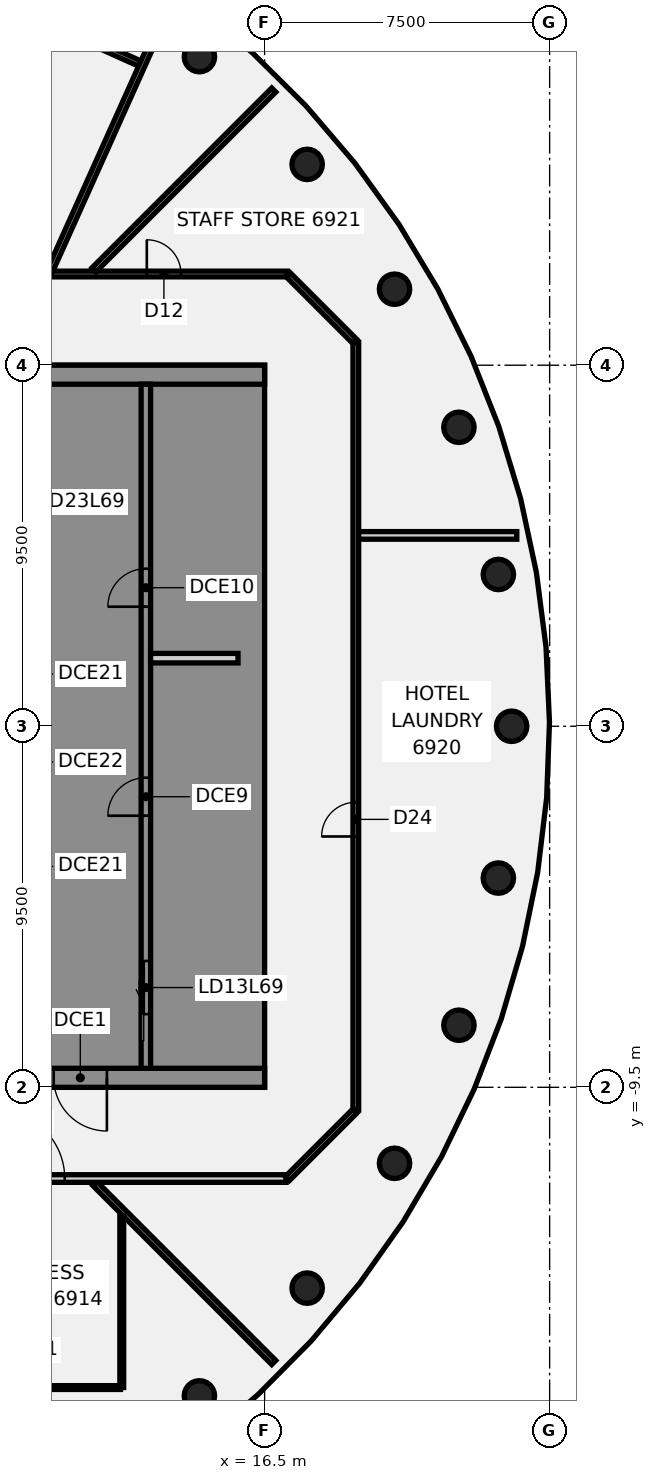
"""IFC4 building model, lengths in metres.
Left out: names, types, materials, properties, quantities, classifications, styles, units other than length and angle.
Written with IfcOpenShell. Run it as: python <this file> out.ifc"""

import sys

from ifc_helpers import new_model, si_unit, direction, frame, frame_2d, origin, origin_2d, place, context, subcontext, project, spatial, polyline, rectangle, circle, outline, extrude, element, fill, save


model = new_model("IFC4")
c1 = context("Model", 3, precision=1e-05, world=origin(), true_north=direction((0.0, 1.0)))
c2 = subcontext(c1, "Body", "Model", "MODEL_VIEW")
j1 = project(units=[si_unit("LENGTHUNIT", "METRE"), si_unit("PLANEANGLEUNIT", "RADIAN")], contexts=[c1])
p1 = place(None, origin())
s1 = spatial("IfcSite", under=j1, at=p1, CompositionType="ELEMENT")
p2 = place(p1, origin())
s2 = spatial("IfcBuilding", under=s1, at=p2, CompositionType="ELEMENT")
p3 = place(p2, frame((0.0, 0.0, 271.2)))
s3 = spatial("IfcBuildingStorey", under=s2, at=p3, CompositionType="ELEMENT", Elevation=271.2)
for number, where, z_axis, x_axis in (
    (1, (23.0, 0.0, -0.14), (0.0, 0.0, 1.0), (1.0, 0.0, 0.0)),
    (2, (22.651, 3.994, -0.14), (0.0, 0.0, 1.0), (1.0, 0.0, 0.0)),
    (3, (21.613, 7.866, -0.14), (0.0, 0.0, 1.0), (1.0, 0.0, 0.0)),
    (4, (19.919, 11.5, -0.14), (0.0, 0.0, 1.0), (1.0, 0.0, 0.0)),
    (5, (17.619, 14.784, -0.14), (0.0, 0.0, 1.0), (1.0, 0.0, 0.0)),
    (6, (14.784, 17.619, -0.14), (0.0, 0.0, 1.0), (1.0, 0.0, 0.0)),
    (7, (14.784, -17.619, -0.14), (0.0, 0.0, 1.0), (1.0, 0.0, 0.0)),
    (8, (17.619, -14.784, -0.14), (0.0, 0.0, 1.0), (1.0, 0.0, 0.0)),
    (9, (19.919, -11.5, -0.14), (0.0, 0.0, 1.0), (1.0, 0.0, 0.0)),
    (10, (21.613, -7.866, -0.14), (0.0, 0.0, 1.0), (1.0, 0.0, 0.0)),
    (11, (22.651, -3.994, -0.14), (0.0, 0.0, 1.0), (1.0, 0.0, 0.0)),
):
    element("IfcColumn", number, at=place(p3, frame(where, z_axis=z_axis, x_axis=x_axis)), inside=s3, PredefinedType="COLUMN", context=c2, shape_type="SweptSolid", body=[
        extrude(circle(Radius=0.4, at=origin_2d()), origin(), (0.0, 0.0, 1.0), 3.6),
    ])
p4 = place(p3, frame((12.034, -12.034, 0.0), z_axis=(0.0, 0.0, 1.0), x_axis=(0.707106781187, -0.707106781187, 0.0)))
e12 = element("IfcWall", 12, at=p4, inside=s3, PredefinedType="PARTITIONING", context=c2, shape_type="SweptSolid", body=[
    extrude(rectangle(XDim=6.655, YDim=0.15, at=frame_2d((3.328, 0.0))), origin(), (0.0, 0.0, 1.0), 2.864),
])
p5 = place(p3, frame((17.128, 11.872, 0.0), z_axis=(0.0, 0.0, 1.0), x_axis=(0.707106781187, -0.707106781187, 0.0)))
e13 = element("IfcWall", 13, at=p5, inside=s3, PredefinedType="PARTITIONING", context=c2, shape_type="SweptSolid", body=[
    extrude(rectangle(XDim=2.465, YDim=0.15, at=frame_2d((1.232, 0.0))), origin(), (0.0, 0.0, 1.0), 2.864),
])
p6 = place(p3, frame((0.344, 23.216, 0.0), z_axis=(0.0, 0.0, 1.0), x_axis=(0.912270853128, -0.409587463838, 0.0)))
e14 = element("IfcWall", 14, at=p6, inside=s3, PredefinedType="PARTITIONING", context=c2, shape_type="SweptSolid", body=[
    extrude(rectangle(XDim=14.109, YDim=0.15, at=frame_2d((7.054, 0.0))), origin(), (0.0, 0.0, 1.0), 2.864),
])
p7 = place(p6, frame((4.65, 0.0, 0.0)))
e15 = element("IfcOpeningElement", 15, at=p7, cuts=e14, PredefinedType="OPENING", context=c2, shape_type="SweptSolid", body=[
    extrude(rectangle(XDim=0.9, YDim=2.1, at=frame_2d((0.45, 1.05))), frame((0.0, 0.085, 0.0), z_axis=(0.0, -1.0, 0.0), x_axis=(1.0, 0.0, 0.0)), (0.0, 0.0, 1.0), 0.17),
])
p8 = place(p3, frame((-17.1, -11.9, 0.0), z_axis=(0.0, 0.0, 1.0), x_axis=(1.0, 0.0, 0.0)))
e16 = element("IfcWall", 16, at=p8, inside=s3, PredefinedType="PARTITIONING", context=c2, shape_type="SweptSolid", body=[
    extrude(rectangle(XDim=34.165, YDim=0.2, at=frame_2d((17.083, 0.0))), origin(), (0.0, 0.0, 1.0), 2.864),
])
p9 = place(p8, frame((6.1, 0.0, 0.0)))
e17 = element("IfcOpeningElement", 17, at=p9, cuts=e16, PredefinedType="OPENING", context=c2, shape_type="SweptSolid", body=[
    extrude(rectangle(XDim=0.9, YDim=2.1, at=frame_2d((0.45, 1.05))), frame((0.0, 0.11, 0.0), z_axis=(0.0, -1.0, 0.0), x_axis=(1.0, 0.0, 0.0)), (0.0, 0.0, 1.0), 0.22),
])
p10 = place(p8, frame((26.541, 0.0, 0.0)))
e18 = element("IfcOpeningElement", 18, at=p10, cuts=e16, PredefinedType="OPENING", context=c2, shape_type="SweptSolid", body=[
    extrude(rectangle(XDim=1.8, YDim=2.1, at=frame_2d((0.9, 1.05))), frame((0.0, 0.11, 0.0), z_axis=(0.0, -1.0, 0.0), x_axis=(1.0, 0.0, 0.0)), (0.0, 0.0, 1.0), 0.22),
])
p11 = place(p8, frame((17.778, 0.0, 0.0)))
e19 = element("IfcOpeningElement", 19, at=p11, cuts=e16, PredefinedType="OPENING", context=c2, shape_type="SweptSolid", body=[
    extrude(rectangle(XDim=1.8, YDim=2.1, at=frame_2d((0.9, 1.05))), frame((0.0, 0.11, 0.0), z_axis=(0.0, -1.0, 0.0), x_axis=(1.0, 0.0, 0.0)), (0.0, 0.0, 1.0), 0.22),
])
p12 = place(p8, frame((10.359, 0.0, 0.0)))
e20 = element("IfcOpeningElement", 20, at=p12, cuts=e16, PredefinedType="OPENING", context=c2, shape_type="SweptSolid", body=[
    extrude(rectangle(XDim=0.9, YDim=2.1, at=frame_2d((0.45, 1.05))), frame((0.0, 0.11, 0.0), z_axis=(0.0, -1.0, 0.0), x_axis=(1.0, 0.0, 0.0)), (0.0, 0.0, 1.0), 0.22),
])
p13 = place(p8, frame((1.65, 0.0, 0.0)))
e21 = element("IfcOpeningElement", 21, at=p13, cuts=e16, PredefinedType="OPENING", context=c2, shape_type="SweptSolid", body=[
    extrude(rectangle(XDim=0.9, YDim=2.1, at=frame_2d((0.45, 1.05))), frame((0.0, 0.11, 0.0), z_axis=(0.0, -1.0, 0.0), x_axis=(1.0, 0.0, 0.0)), (0.0, 0.0, 1.0), 0.22),
])
p14 = place(p3, frame((-17.065, 11.9, 0.0), z_axis=(0.0, 0.0, 1.0), x_axis=(1.0, 0.0, 0.0)))
e22 = element("IfcWall", 22, at=p14, inside=s3, PredefinedType="PARTITIONING", context=c2, shape_type="SweptSolid", body=[
    extrude(rectangle(XDim=34.165, YDim=0.15, at=frame_2d((17.083, 0.0))), origin(), (0.0, 0.0, 1.0), 2.864),
])
p15 = place(p14, frame((23.556, 0.0, 0.0)))
e23 = element("IfcOpeningElement", 23, at=p15, cuts=e22, PredefinedType="OPENING", context=c2, shape_type="SweptSolid", body=[
    extrude(rectangle(XDim=1.8, YDim=2.1, at=frame_2d((0.9, 1.05))), frame((0.0, 0.085, 0.0), z_axis=(0.0, -1.0, 0.0), x_axis=(1.0, 0.0, 0.0)), (0.0, 0.0, 1.0), 0.17),
])
p16 = place(p14, frame((30.465, 0.0, 0.0)))
e24 = element("IfcOpeningElement", 24, at=p16, cuts=e22, PredefinedType="OPENING", context=c2, shape_type="SweptSolid", body=[
    extrude(rectangle(XDim=0.9, YDim=2.1, at=frame_2d((0.45, 1.05))), frame((0.0, 0.085, 0.0), z_axis=(0.0, -1.0, 0.0), x_axis=(1.0, 0.0, 0.0)), (0.0, 0.0, 1.0), 0.17),
])
p17 = place(p14, frame((12.215, 0.0, 0.0)))
e25 = element("IfcOpeningElement", 25, at=p17, cuts=e22, PredefinedType="OPENING", context=c2, shape_type="SweptSolid", body=[
    extrude(rectangle(XDim=1.8, YDim=2.1, at=frame_2d((0.9, 1.05))), frame((0.0, 0.085, 0.0), z_axis=(0.0, -1.0, 0.0), x_axis=(1.0, 0.0, 0.0)), (0.0, 0.0, 1.0), 0.17),
])
p18 = place(p3, frame((8.276, -17.4, 0.0), z_axis=(0.0, 0.0, 1.0), x_axis=(1.0, 0.0, 0.0)))
e26 = element("IfcWall", 26, at=p18, inside=s3, PredefinedType="PARTITIONING", context=c2, shape_type="SweptSolid", body=[
    extrude(rectangle(XDim=4.43, YDim=0.1, at=frame_2d((2.215, 0.0))), origin(), (0.0, 0.0, 1.0), 2.864),
])
p19 = place(p3, frame((18.955, 5.022, 0.0), z_axis=(0.0, 0.0, 1.0), x_axis=(1.0, 0.0, 0.0)))
e27 = element("IfcWall", 27, at=p19, inside=s3, PredefinedType="PARTITIONING", context=c2, shape_type="SweptSolid", body=[
    extrude(rectangle(XDim=4.181, YDim=0.2, at=frame_2d((2.09, 0.0))), origin(), (0.0, 0.0, 1.0), 2.864),
])
p20 = place(p3, frame((12.01, 12.01, 0.0), z_axis=(0.0, 0.0, 1.0), x_axis=(0.707106781187, 0.707106781187, 0.0)))
e28 = element("IfcWall", 28, at=p20, inside=s3, PredefinedType="PARTITIONING", context=c2, shape_type="SweptSolid", body=[
    extrude(rectangle(XDim=6.691, YDim=0.15, at=frame_2d((3.345, 0.0))), origin(), (0.0, 0.0, 1.0), 2.864),
])
p21 = place(p3, frame((17.1, -11.9, 0.0), z_axis=(0.0, 0.0, 1.0), x_axis=(0.707106781187, 0.707106781187, 0.0)))
e29 = element("IfcWall", 29, at=p21, inside=s3, PredefinedType="PARTITIONING", context=c2, shape_type="SweptSolid", body=[
    extrude(rectangle(XDim=2.505, YDim=0.15, at=frame_2d((1.253, 0.0))), origin(), (0.0, 0.0, 1.0), 2.864),
])
p22 = place(p3, frame((10.851, 11.987, 0.0), z_axis=(0.0, 0.0, 1.0), x_axis=(0.409585598201, 0.912271690751, 0.0)))
e30 = element("IfcWall", 30, at=p22, inside=s3, PredefinedType="PARTITIONING", context=c2, shape_type="SweptSolid", body=[
    extrude(rectangle(XDim=7.767, YDim=0.15, at=frame_2d((3.884, 0.0))), origin(), (0.0, 0.0, 1.0), 2.864),
])
p23 = place(p3, frame((12.741, -17.4, 0.0), z_axis=(0.0, 0.0, 1.0), x_axis=(0.0, 1.0, 0.0)))
e31 = element("IfcWall", 31, at=p23, inside=s3, PredefinedType="PARTITIONING", context=c2, shape_type="SweptSolid", body=[
    extrude(rectangle(XDim=4.519, YDim=0.1, at=frame_2d((2.259, 0.0))), origin(), (0.0, 0.0, 1.0), 2.864),
])
p24 = place(p3, frame((18.9, -10.1, 0.0), z_axis=(0.0, 0.0, 1.0), x_axis=(0.0, 1.0, 0.0)))
e32 = element("IfcWall", 32, at=p24, inside=s3, PredefinedType="PARTITIONING", context=c2, shape_type="SweptSolid", body=[
    extrude(rectangle(XDim=20.2, YDim=0.15, at=frame_2d((10.1, 0.0))), origin(), (0.0, 0.0, 1.0), 2.864),
])
p25 = place(p24, frame((7.2, 0.0, 0.0)))
e33 = element("IfcOpeningElement", 33, at=p25, cuts=e32, PredefinedType="OPENING", context=c2, shape_type="SweptSolid", body=[
    extrude(rectangle(XDim=0.9, YDim=2.1, at=frame_2d((0.45, 1.05))), frame((0.0, 0.085, 0.0), z_axis=(0.0, -1.0, 0.0), x_axis=(1.0, 0.0, 0.0)), (0.0, 0.0, 1.0), 0.17),
])
p26 = place(p3, frame((16.5, -9.25, 0.0), z_axis=(0.0, 0.0, 1.0), x_axis=(-1.0, 0.0, 0.0)))
e34 = element("IfcWall", 34, at=p26, inside=s3, PredefinedType="SHEAR", context=c2, shape_type="SweptSolid", body=[
    extrude(rectangle(XDim=13.0, YDim=0.5, at=frame_2d((6.5, 0.0))), origin(), (0.0, 0.0, 1.0), 3.46),
])
p27 = place(p26, frame((4.15, 0.0, 0.0)))
e35 = element("IfcOpeningElement", 35, at=p27, cuts=e34, PredefinedType="OPENING", context=c2, shape_type="SweptSolid", body=[
    extrude(rectangle(XDim=1.4, YDim=2.1, at=frame_2d((0.7, 1.05))), frame((0.0, 0.26, 0.0), z_axis=(0.0, -1.0, 0.0), x_axis=(1.0, 0.0, 0.0)), (0.0, 0.0, 1.0), 0.52),
])
p28 = place(p26, frame((10.125, 0.0, 0.0)))
e36 = element("IfcOpeningElement", 36, at=p28, cuts=e34, PredefinedType="OPENING", context=c2, shape_type="SweptSolid", body=[
    extrude(rectangle(XDim=1.4, YDim=2.1, at=frame_2d((0.7, 1.05))), frame((0.0, 0.26, 0.0), z_axis=(0.0, -1.0, 0.0), x_axis=(1.0, 0.0, 0.0)), (0.0, 0.0, 1.0), 0.52),
])
p29 = place(p3, origin())
e37 = element("IfcWall", 37, at=p29, inside=s3, PredefinedType="SHEAR", context=c2, shape_type="SweptSolid", body=[
    extrude(outline(polyline([(13.5, -8.125), (13.5, -9.0), (16.0, -9.0), (16.5, -9.0), (16.5, 9.0), (16.0, 9.0), (13.5, 9.0), (13.5, 8.125), (16.0, 8.125), (16.0, 5.625), (13.5, 5.625), (13.5, 5.375), (16.0, 5.375), (16.0, -5.375), (13.5, -5.375), (13.5, -5.625), (16.0, -5.625), (16.0, -8.125), (13.5, -8.125)])), origin(), (0.0, 0.0, 1.0), 3.46),
])
p30 = place(p3, frame((16.5, 9.25, 0.0), z_axis=(0.0, 0.0, 1.0), x_axis=(-1.0, 0.0, 0.0)))
e38 = element("IfcWall", 38, at=p30, inside=s3, PredefinedType="SHEAR", context=c2, shape_type="SweptSolid", body=[
    extrude(rectangle(XDim=13.0, YDim=0.5, at=frame_2d((6.5, 0.0))), origin(), (0.0, 0.0, 1.0), 3.46),
])
p31 = place(p3, frame((13.375, -9.0, 0.0), z_axis=(0.0, 0.0, 1.0), x_axis=(0.0, 1.0, 0.0)))
e39 = element("IfcWall", 39, at=p31, inside=s3, PredefinedType="SHEAR", context=c2, shape_type="SweptSolid", body=[
    extrude(rectangle(XDim=18.0, YDim=0.25, at=frame_2d((9.0, 0.0))), origin(), (0.0, 0.0, 1.0), 3.46),
])
p32 = place(p31, frame((1.425, 0.0, 0.0)))
e40 = element("IfcOpeningElement", 40, at=p32, cuts=e39, PredefinedType="OPENING", context=c2, shape_type="SweptSolid", body=[
    extrude(rectangle(XDim=1.4, YDim=2.1, at=frame_2d((0.7, 1.05))), frame((0.0, 0.135, 0.0), z_axis=(0.0, -1.0, 0.0), x_axis=(1.0, 0.0, 0.0)), (0.0, 0.0, 1.0), 0.27),
])
p33 = place(p31, frame((6.646, 0.0, 0.0)))
e41 = element("IfcOpeningElement", 41, at=p33, cuts=e39, PredefinedType="OPENING", context=c2, shape_type="SweptSolid", body=[
    extrude(rectangle(XDim=1.0, YDim=2.1, at=frame_2d((0.5, 1.05))), frame((0.0, 0.135, 0.0), z_axis=(0.0, -1.0, 0.0), x_axis=(1.0, 0.0, 0.0)), (0.0, 0.0, 1.0), 0.27),
])
p34 = place(p31, frame((12.146, 0.0, 0.0)))
e42 = element("IfcOpeningElement", 42, at=p34, cuts=e39, PredefinedType="OPENING", context=c2, shape_type="SweptSolid", body=[
    extrude(rectangle(XDim=1.0, YDim=2.1, at=frame_2d((0.5, 1.05))), frame((0.0, 0.135, 0.0), z_axis=(0.0, -1.0, 0.0), x_axis=(1.0, 0.0, 0.0)), (0.0, 0.0, 1.0), 0.27),
])
p35 = place(p3, frame((15.8, 1.792, 0.0), z_axis=(0.0, 0.0, 1.0), x_axis=(-1.0, 0.0, 0.0)))
e43 = element("IfcWall", 43, at=p35, inside=s3, PredefinedType="PARTITIONING", context=c2, shape_type="SweptSolid", body=[
    extrude(rectangle(XDim=2.3, YDim=0.25, at=frame_2d((1.15, 0.0))), origin(), (0.0, 0.0, 1.0), 3.46),
])
p36 = place(p10, frame((1.8, 0.0, 0.0), z_axis=(0.0, 0.0, 1.0), x_axis=(-1.0, 0.0, 0.0)))
e44 = element("IfcDoor", 44, at=p36, inside=s3, OperationType="DOUBLE_DOOR_SINGLE_SWING", PredefinedType="DOOR", context=c2, shape_type="SweptSolid", body=[
    extrude(rectangle(XDim=1.8, YDim=2.1, at=frame_2d((0.9, 1.05))), frame((0.0, 0.025, 0.0), z_axis=(0.0, -1.0, 0.0), x_axis=(1.0, 0.0, 0.0)), (0.0, 0.0, 1.0), 0.05),
])
fill(e18, e44)
p37 = place(p16, origin())
e45 = element("IfcDoor", 45, at=p37, inside=s3, OperationType="SINGLE_SWING_LEFT", PredefinedType="DOOR", context=c2, shape_type="SweptSolid", body=[
    extrude(rectangle(XDim=0.9, YDim=2.1, at=frame_2d((0.45, 1.05))), frame((0.0, 0.025, 0.0), z_axis=(0.0, -1.0, 0.0), x_axis=(1.0, 0.0, 0.0)), (0.0, 0.0, 1.0), 0.05),
])
fill(e24, e45)
p38 = place(p25, frame((0.9, 0.0, 0.0), z_axis=(0.0, 0.0, 1.0), x_axis=(-1.0, 0.0, 0.0)))
e46 = element("IfcDoor", 46, at=p38, inside=s3, OperationType="SINGLE_SWING_LEFT", PredefinedType="DOOR", context=c2, shape_type="SweptSolid", body=[
    extrude(rectangle(XDim=0.9, YDim=2.1, at=frame_2d((0.45, 1.05))), frame((0.0, 0.025, 0.0), z_axis=(0.0, -1.0, 0.0), x_axis=(1.0, 0.0, 0.0)), (0.0, 0.0, 1.0), 0.05),
])
fill(e33, e46)
p39 = place(p27, origin())
e47 = element("IfcDoor", 47, at=p39, inside=s3, OperationType="SINGLE_SWING_LEFT", PredefinedType="DOOR", context=c2, shape_type="SweptSolid", body=[
    extrude(rectangle(XDim=1.4, YDim=2.1, at=frame_2d((0.7, 1.05))), frame((0.0, 0.025, 0.0), z_axis=(0.0, -1.0, 0.0), x_axis=(1.0, 0.0, 0.0)), (0.0, 0.0, 1.0), 0.05),
])
fill(e35, e47)
p40 = place(p32, origin())
e48 = element("IfcDoor", 48, at=p40, inside=s3, OperationType="SLIDING_TO_LEFT", PredefinedType="DOOR", context=c2, shape_type="SweptSolid", body=[
    extrude(rectangle(XDim=1.4, YDim=2.1, at=frame_2d((0.7, 1.05))), frame((0.0, 0.025, 0.0), z_axis=(0.0, -1.0, 0.0), x_axis=(1.0, 0.0, 0.0)), (0.0, 0.0, 1.0), 0.05),
])
fill(e40, e48)
p41 = place(p33, origin())
e49 = element("IfcDoor", 49, at=p41, inside=s3, OperationType="SINGLE_SWING_LEFT", PredefinedType="DOOR", context=c2, shape_type="SweptSolid", body=[
    extrude(rectangle(XDim=1.0, YDim=2.1, at=frame_2d((0.5, 1.05))), frame((0.0, 0.025, 0.0), z_axis=(0.0, -1.0, 0.0), x_axis=(1.0, 0.0, 0.0)), (0.0, 0.0, 1.0), 0.05),
])
fill(e41, e49)
p42 = place(p34, origin())
e50 = element("IfcDoor", 50, at=p42, inside=s3, OperationType="SINGLE_SWING_LEFT", PredefinedType="DOOR", context=c2, shape_type="SweptSolid", body=[
    extrude(rectangle(XDim=1.0, YDim=2.1, at=frame_2d((0.5, 1.05))), frame((0.0, 0.025, 0.0), z_axis=(0.0, -1.0, 0.0), x_axis=(1.0, 0.0, 0.0)), (0.0, 0.0, 1.0), 0.05),
])
fill(e42, e50)
save(model, sys.argv[1])
